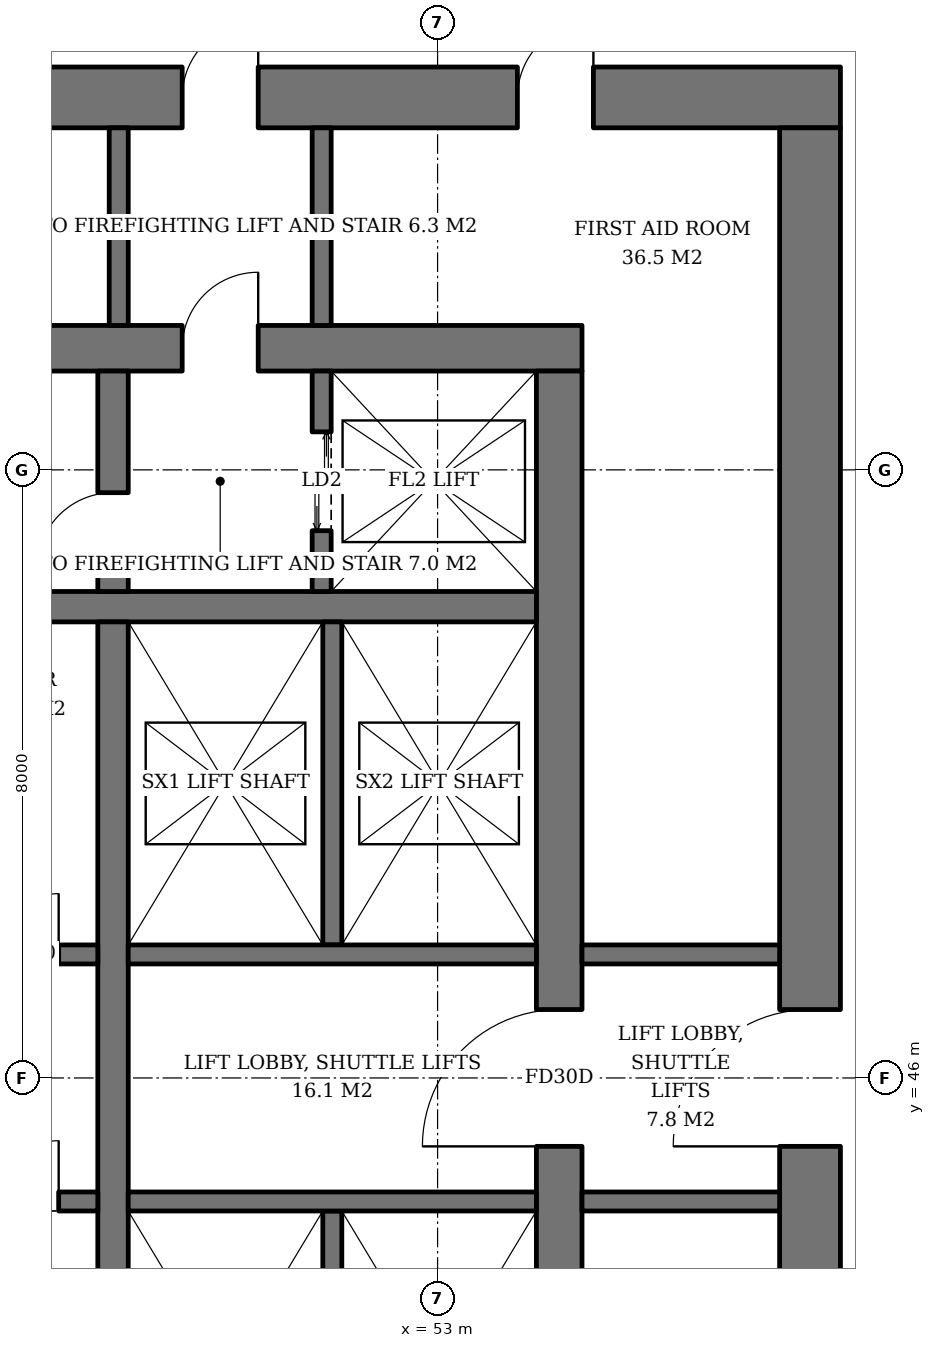
"""IFC4 building model, lengths in metres.
Left out: names, types, materials, properties, quantities, classifications, styles, units other than length and angle.
Written with IfcOpenShell. Run it as: python <this file> out.ifc"""

import sys

from ifc_helpers import new_model, si_unit, direction, frame, frame_2d, origin, place, context, subcontext, project, spatial, rectangle, extrude, element, fill, save


model = new_model("IFC4")
c1 = context("Model", 3, precision=1e-05, world=origin(), true_north=direction((0.0, 1.0)))
c2 = subcontext(c1, "Body", "Model", "MODEL_VIEW")
j1 = project(units=[si_unit("LENGTHUNIT", "METRE"), si_unit("PLANEANGLEUNIT", "RADIAN")], contexts=[c1])
p1 = place(None, origin())
s1 = spatial("IfcSite", under=j1, at=p1, CompositionType="ELEMENT")
p2 = place(p1, origin())
s2 = spatial("IfcBuilding", under=s1, at=p2, CompositionType="ELEMENT")
p3 = place(p2, frame((0.0, 0.0, 24.8)))
s3 = spatial("IfcBuildingStorey", under=s2, at=p3, CompositionType="ELEMENT", Elevation=24.8)
p4 = place(p3, frame((35.1, 55.6, 0.0), z_axis=(0.0, 0.0, 1.0), x_axis=(1.0, 0.0, 0.0)))
e1 = element("IfcWall", 1, at=p4, inside=s3, PredefinedType="SHEAR", context=c2, shape_type="SweptSolid", body=[
    extrude(rectangle(XDim=19.8, YDim=0.6, at=frame_2d((9.9, 0.0))), origin(), (0.0, 0.0, 1.0), 3.8),
])
p5 = place(p4, frame((14.54, 0.0, 0.0)))
e2 = element("IfcOpeningElement", 2, at=p5, cuts=e1, PredefinedType="OPENING", context=c2, shape_type="SweptSolid", body=[
    extrude(rectangle(XDim=1.0, YDim=2.1, at=frame_2d((0.5, 1.05))), frame((0.0, 0.31, 0.0), z_axis=(0.0, -1.0, 0.0), x_axis=(1.0, 0.0, 0.0)), (0.0, 0.0, 1.0), 0.62),
])
p6 = place(p4, frame((2.425, 0.0, 0.0)))
e3 = element("IfcOpeningElement", 3, at=p6, cuts=e1, PredefinedType="OPENING", context=c2, shape_type="SweptSolid", body=[
    extrude(rectangle(XDim=1.0, YDim=2.1, at=frame_2d((0.5, 1.05))), frame((0.0, 0.31, 0.0), z_axis=(0.0, -1.0, 0.0), x_axis=(1.0, 0.0, 0.0)), (0.0, 0.0, 1.0), 0.62),
])
p7 = place(p3, frame((54.6, 36.7, 0.0), z_axis=(0.0, 0.0, 1.0), x_axis=(0.0, 1.0, 0.0)))
e4 = element("IfcWall", 4, at=p7, inside=s3, PredefinedType="SHEAR", context=c2, shape_type="SweptSolid", body=[
    extrude(rectangle(XDim=18.6, YDim=0.6, at=frame_2d((9.3, 0.0))), origin(), (0.0, 0.0, 1.0), 3.8),
])
p8 = place(p7, frame((8.4, 0.0, 0.0)))
e5 = element("IfcOpeningElement", 5, at=p8, cuts=e4, PredefinedType="OPENING", context=c2, shape_type="SweptSolid", body=[
    extrude(rectangle(XDim=1.8, YDim=2.4, at=frame_2d((0.9, 1.2))), frame((0.0, 0.31, 0.0), z_axis=(0.0, -1.0, 0.0), x_axis=(1.0, 0.0, 0.0)), (0.0, 0.0, 1.0), 0.62),
])
p9 = place(p3, frame((31.7, 58.9, 0.0), z_axis=(0.0, 0.0, 1.0), x_axis=(1.0, 0.0, 0.0)))
e6 = element("IfcWall", 6, at=p9, inside=s3, PredefinedType="SHEAR", context=c2, shape_type="SweptSolid", body=[
    extrude(rectangle(XDim=26.6, YDim=0.8, at=frame_2d((13.3, 0.0))), origin(), (0.0, 0.0, 1.0), 3.8),
])
p10 = place(p9, frame((17.94, 0.0, 0.0)))
e7 = element("IfcOpeningElement", 7, at=p10, cuts=e6, PredefinedType="OPENING", context=c2, shape_type="SweptSolid", body=[
    extrude(rectangle(XDim=1.0, YDim=2.1, at=frame_2d((0.5, 1.05))), frame((0.0, 0.41, 0.0), z_axis=(0.0, -1.0, 0.0), x_axis=(1.0, 0.0, 0.0)), (0.0, 0.0, 1.0), 0.82),
])
p11 = place(p9, frame((5.825, 0.0, 0.0)))
e8 = element("IfcOpeningElement", 8, at=p11, cuts=e6, PredefinedType="OPENING", context=c2, shape_type="SweptSolid", body=[
    extrude(rectangle(XDim=1.0, YDim=2.1, at=frame_2d((0.5, 1.05))), frame((0.0, 0.41, 0.0), z_axis=(0.0, -1.0, 0.0), x_axis=(1.0, 0.0, 0.0)), (0.0, 0.0, 1.0), 0.82),
])
p12 = place(p9, frame((2.637, 0.0, 0.0)))
e9 = element("IfcOpeningElement", 9, at=p12, cuts=e6, PredefinedType="OPENING", context=c2, shape_type="SweptSolid", body=[
    extrude(rectangle(XDim=1.0, YDim=2.1, at=frame_2d((0.5, 1.05))), frame((0.0, 0.41, 0.0), z_axis=(0.0, -1.0, 0.0), x_axis=(1.0, 0.0, 0.0)), (0.0, 0.0, 1.0), 0.82),
])
p13 = place(p9, frame((9.126, 0.0, 0.0)))
e10 = element("IfcOpeningElement", 10, at=p13, cuts=e6, PredefinedType="OPENING", context=c2, shape_type="SweptSolid", body=[
    extrude(rectangle(XDim=1.0, YDim=2.1, at=frame_2d((0.5, 1.05))), frame((0.0, 0.41, 0.0), z_axis=(0.0, -1.0, 0.0), x_axis=(1.0, 0.0, 0.0)), (0.0, 0.0, 1.0), 0.82),
])
p14 = place(p9, frame((14.029, 0.0, 0.0)))
e11 = element("IfcOpeningElement", 11, at=p14, cuts=e6, PredefinedType="OPENING", context=c2, shape_type="SweptSolid", body=[
    extrude(rectangle(XDim=1.0, YDim=2.1, at=frame_2d((0.5, 1.05))), frame((0.0, 0.41, 0.0), z_axis=(0.0, -1.0, 0.0), x_axis=(1.0, 0.0, 0.0)), (0.0, 0.0, 1.0), 0.82),
])
p15 = place(p9, frame((22.35, 0.0, 0.0)))
e12 = element("IfcOpeningElement", 12, at=p15, cuts=e6, PredefinedType="OPENING", context=c2, shape_type="SweptSolid", body=[
    extrude(rectangle(XDim=1.0, YDim=2.1, at=frame_2d((0.5, 1.05))), frame((0.0, 0.41, 0.0), z_axis=(0.0, -1.0, 0.0), x_axis=(1.0, 0.0, 0.0)), (0.0, 0.0, 1.0), 0.82),
])
p16 = place(p3, frame((57.9, 33.5, 0.0), z_axis=(0.0, 0.0, 1.0), x_axis=(0.0, 1.0, 0.0)))
e13 = element("IfcWall", 13, at=p16, inside=s3, PredefinedType="SHEAR", context=c2, shape_type="SweptSolid", body=[
    extrude(rectangle(XDim=25.0, YDim=0.8, at=frame_2d((12.5, 0.0))), origin(), (0.0, 0.0, 1.0), 3.8),
])
p17 = place(p16, frame((11.6, 0.0, 0.0)))
e14 = element("IfcOpeningElement", 14, at=p17, cuts=e13, PredefinedType="OPENING", context=c2, shape_type="SweptSolid", body=[
    extrude(rectangle(XDim=1.8, YDim=2.4, at=frame_2d((0.9, 1.2))), frame((0.0, 0.41, 0.0), z_axis=(0.0, -1.0, 0.0), x_axis=(1.0, 0.0, 0.0)), (0.0, 0.0, 1.0), 0.82),
])
p18 = place(p3, frame((35.7, 52.2, 0.0), z_axis=(0.0, 0.0, 1.0), x_axis=(1.0, 0.0, 0.0)))
e15 = element("IfcWall", 15, at=p18, inside=s3, PredefinedType="SHEAR", context=c2, shape_type="SweptSolid", body=[
    extrude(rectangle(XDim=18.6, YDim=0.4, at=frame_2d((9.3, 0.0))), origin(), (0.0, 0.0, 1.0), 3.8),
])
p19 = place(p3, frame((48.73, 40.0, 0.0), z_axis=(0.0, 0.0, 1.0), x_axis=(0.0, 1.0, 0.0)))
e16 = element("IfcWall", 16, at=p19, inside=s3, PredefinedType="SHEAR", context=c2, shape_type="SweptSolid", body=[
    extrude(rectangle(XDim=12.0, YDim=0.4, at=frame_2d((6.0, 0.0))), origin(), (0.0, 0.0, 1.0), 3.8),
])
p20 = place(p3, frame((48.73, 52.4, 0.0), z_axis=(0.0, 0.0, 1.0), x_axis=(0.0, 1.0, 0.0)))
e17 = element("IfcWall", 17, at=p20, inside=s3, PredefinedType="SHEAR", context=c2, shape_type="SweptSolid", body=[
    extrude(rectangle(XDim=2.9, YDim=0.4, at=frame_2d((1.45, 0.0))), origin(), (0.0, 0.0, 1.0), 3.8),
])
p21 = place(p20, frame((0.3, 0.0, 0.0)))
e18 = element("IfcOpeningElement", 18, at=p21, cuts=e17, PredefinedType="OPENING", context=c2, shape_type="SweptSolid", body=[
    extrude(rectangle(XDim=1.0, YDim=2.1, at=frame_2d((0.5, 1.05))), frame((0.0, 0.21, 0.0), z_axis=(0.0, -1.0, 0.0), x_axis=(1.0, 0.0, 0.0)), (0.0, 0.0, 1.0), 0.42),
])
p22 = place(p3, frame((51.475, 52.4, 0.0), z_axis=(0.0, 0.0, 1.0), x_axis=(0.0, 1.0, 0.0)))
e19 = element("IfcWall", 19, at=p22, inside=s3, PredefinedType="SHEAR", context=c2, shape_type="SweptSolid", body=[
    extrude(rectangle(XDim=2.9, YDim=0.25, at=frame_2d((1.45, 0.0))), origin(), (0.0, 0.0, 1.0), 3.8),
])
p23 = place(p22, frame((0.8, 0.0, 0.0)))
e20 = element("IfcOpeningElement", 20, at=p23, cuts=e19, PredefinedType="OPENING", context=c2, shape_type="SweptSolid", body=[
    extrude(rectangle(XDim=1.3, YDim=2.2, at=frame_2d((0.65, 1.1))), frame((0.0, 0.135, 0.0), z_axis=(0.0, -1.0, 0.0), x_axis=(1.0, 0.0, 0.0)), (0.0, 0.0, 1.0), 0.27),
])
p24 = place(p3, frame((35.7, 47.625, 0.0), z_axis=(0.0, 0.0, 1.0), x_axis=(1.0, 0.0, 0.0)))
e21 = element("IfcWall", 21, at=p24, inside=s3, PredefinedType="SHEAR", context=c2, shape_type="SweptSolid", body=[
    extrude(rectangle(XDim=12.83, YDim=0.25, at=frame_2d((6.415, 0.0))), origin(), (0.0, 0.0, 1.0), 3.8),
])
p25 = place(p24, frame((0.7, 0.0, 0.0)))
e22 = element("IfcOpeningElement", 22, at=p25, cuts=e21, PredefinedType="OPENING", context=c2, shape_type="SweptSolid", body=[
    extrude(rectangle(XDim=1.1, YDim=2.2, at=frame_2d((0.55, 1.1))), frame((0.0, 0.135, 0.0), z_axis=(0.0, -1.0, 0.0), x_axis=(1.0, 0.0, 0.0)), (0.0, 0.0, 1.0), 0.27),
])
p26 = place(p24, frame((3.45, 0.0, 0.0)))
e23 = element("IfcOpeningElement", 23, at=p26, cuts=e21, PredefinedType="OPENING", context=c2, shape_type="SweptSolid", body=[
    extrude(rectangle(XDim=1.1, YDim=2.2, at=frame_2d((0.55, 1.1))), frame((0.0, 0.135, 0.0), z_axis=(0.0, -1.0, 0.0), x_axis=(1.0, 0.0, 0.0)), (0.0, 0.0, 1.0), 0.27),
])
p27 = place(p24, frame((6.2, 0.0, 0.0)))
e24 = element("IfcOpeningElement", 24, at=p27, cuts=e21, PredefinedType="OPENING", context=c2, shape_type="SweptSolid", body=[
    extrude(rectangle(XDim=1.1, YDim=2.2, at=frame_2d((0.55, 1.1))), frame((0.0, 0.135, 0.0), z_axis=(0.0, -1.0, 0.0), x_axis=(1.0, 0.0, 0.0)), (0.0, 0.0, 1.0), 0.27),
])
p28 = place(p24, frame((8.95, 0.0, 0.0)))
e25 = element("IfcOpeningElement", 25, at=p28, cuts=e21, PredefinedType="OPENING", context=c2, shape_type="SweptSolid", body=[
    extrude(rectangle(XDim=1.1, YDim=2.2, at=frame_2d((0.55, 1.1))), frame((0.0, 0.135, 0.0), z_axis=(0.0, -1.0, 0.0), x_axis=(1.0, 0.0, 0.0)), (0.0, 0.0, 1.0), 0.27),
])
p29 = place(p24, frame((11.515, 0.0, 0.0)))
e26 = element("IfcOpeningElement", 26, at=p29, cuts=e21, PredefinedType="OPENING", context=c2, shape_type="SweptSolid", body=[
    extrude(rectangle(XDim=0.8, YDim=2.0, at=frame_2d((0.4, 1.0))), frame((0.0, 0.135, 0.0), z_axis=(0.0, -1.0, 0.0), x_axis=(1.0, 0.0, 0.0)), (0.0, 0.0, 1.0), 0.27),
])
p30 = place(p3, frame((35.7, 44.375, 0.0), z_axis=(0.0, 0.0, 1.0), x_axis=(1.0, 0.0, 0.0)))
e27 = element("IfcWall", 27, at=p30, inside=s3, PredefinedType="SHEAR", context=c2, shape_type="SweptSolid", body=[
    extrude(rectangle(XDim=12.83, YDim=0.25, at=frame_2d((6.415, 0.0))), origin(), (0.0, 0.0, 1.0), 3.8),
])
p31 = place(p30, frame((0.7, 0.0, 0.0)))
e28 = element("IfcOpeningElement", 28, at=p31, cuts=e27, PredefinedType="OPENING", context=c2, shape_type="SweptSolid", body=[
    extrude(rectangle(XDim=1.1, YDim=2.2, at=frame_2d((0.55, 1.1))), frame((0.0, 0.135, 0.0), z_axis=(0.0, -1.0, 0.0), x_axis=(1.0, 0.0, 0.0)), (0.0, 0.0, 1.0), 0.27),
])
p32 = place(p30, frame((3.45, 0.0, 0.0)))
e29 = element("IfcOpeningElement", 29, at=p32, cuts=e27, PredefinedType="OPENING", context=c2, shape_type="SweptSolid", body=[
    extrude(rectangle(XDim=1.1, YDim=2.2, at=frame_2d((0.55, 1.1))), frame((0.0, 0.135, 0.0), z_axis=(0.0, -1.0, 0.0), x_axis=(1.0, 0.0, 0.0)), (0.0, 0.0, 1.0), 0.27),
])
p33 = place(p30, frame((6.2, 0.0, 0.0)))
e30 = element("IfcOpeningElement", 30, at=p33, cuts=e27, PredefinedType="OPENING", context=c2, shape_type="SweptSolid", body=[
    extrude(rectangle(XDim=1.1, YDim=2.2, at=frame_2d((0.55, 1.1))), frame((0.0, 0.135, 0.0), z_axis=(0.0, -1.0, 0.0), x_axis=(1.0, 0.0, 0.0)), (0.0, 0.0, 1.0), 0.27),
])
p34 = place(p30, frame((8.95, 0.0, 0.0)))
e31 = element("IfcOpeningElement", 31, at=p34, cuts=e27, PredefinedType="OPENING", context=c2, shape_type="SweptSolid", body=[
    extrude(rectangle(XDim=1.1, YDim=2.2, at=frame_2d((0.55, 1.1))), frame((0.0, 0.135, 0.0), z_axis=(0.0, -1.0, 0.0), x_axis=(1.0, 0.0, 0.0)), (0.0, 0.0, 1.0), 0.27),
])
p35 = place(p30, frame((11.515, 0.0, 0.0)))
e32 = element("IfcOpeningElement", 32, at=p35, cuts=e27, PredefinedType="OPENING", context=c2, shape_type="SweptSolid", body=[
    extrude(rectangle(XDim=0.8, YDim=2.0, at=frame_2d((0.4, 1.0))), frame((0.0, 0.135, 0.0), z_axis=(0.0, -1.0, 0.0), x_axis=(1.0, 0.0, 0.0)), (0.0, 0.0, 1.0), 0.27),
])
p36 = place(p3, frame((51.615, 47.75, 0.0), z_axis=(0.0, 0.0, 1.0), x_axis=(0.0, 1.0, 0.0)))
e33 = element("IfcWall", 33, at=p36, inside=s3, PredefinedType="SHEAR", context=c2, shape_type="SweptSolid", body=[
    extrude(rectangle(XDim=4.25, YDim=0.25, at=frame_2d((2.125, 0.0))), origin(), (0.0, 0.0, 1.0), 3.8),
])
p37 = place(p3, frame((48.93, 47.625, 0.0), z_axis=(0.0, 0.0, 1.0), x_axis=(1.0, 0.0, 0.0)))
e34 = element("IfcWall", 34, at=p37, inside=s3, PredefinedType="SHEAR", context=c2, shape_type="SweptSolid", body=[
    extrude(rectangle(XDim=5.37, YDim=0.25, at=frame_2d((2.685, 0.0))), origin(), (0.0, 0.0, 1.0), 3.8),
])
p38 = place(p3, frame((51.615, 44.25, 0.0), z_axis=(0.0, 0.0, 1.0), x_axis=(0.0, -1.0, 0.0)))
e35 = element("IfcWall", 35, at=p38, inside=s3, PredefinedType="SHEAR", context=c2, shape_type="SweptSolid", body=[
    extrude(rectangle(XDim=4.25, YDim=0.25, at=frame_2d((2.125, 0.0))), origin(), (0.0, 0.0, 1.0), 3.8),
])
p39 = place(p3, frame((48.93, 44.375, 0.0), z_axis=(0.0, 0.0, 1.0), x_axis=(1.0, 0.0, 0.0)))
e36 = element("IfcWall", 36, at=p39, inside=s3, PredefinedType="SHEAR", context=c2, shape_type="SweptSolid", body=[
    extrude(rectangle(XDim=5.37, YDim=0.25, at=frame_2d((2.685, 0.0))), origin(), (0.0, 0.0, 1.0), 3.8),
])
for number, where, z_axis, x_axis in (
    (37, (48.805, 55.9, 0.0), (0.0, 0.0, 1.0), (0.0, 1.0, 0.0)),
    (38, (51.475, 55.9, 0.0), (0.0, 0.0, 1.0), (0.0, 1.0, 0.0)),
    (39, (54.9, 44.375, 0.0), (0.0, 0.0, 1.0), (1.0, 0.0, 0.0)),
    (40, (54.9, 47.625, 0.0), (0.0, 0.0, 1.0), (1.0, 0.0, 0.0)),
):
    element("IfcWall", number, at=place(p3, frame(where, z_axis=z_axis, x_axis=x_axis)), inside=s3, PredefinedType="SOLIDWALL", context=c2, shape_type="SweptSolid", body=[
        extrude(rectangle(XDim=2.6, YDim=0.25, at=frame_2d((1.3, 0.0))), origin(), (0.0, 0.0, 1.0), 3.62),
    ])
p40 = place(p23, origin())
e41 = element("IfcDoor", 41, at=p40, inside=s3, OperationType="DOUBLE_DOOR_SLIDING", PredefinedType="DOOR", context=c2, shape_type="SweptSolid", body=[
    extrude(rectangle(XDim=1.3, YDim=2.2, at=frame_2d((0.65, 1.1))), frame((0.0, 0.025, 0.0), z_axis=(0.0, -1.0, 0.0), x_axis=(1.0, 0.0, 0.0)), (0.0, 0.0, 1.0), 0.05),
])
fill(e20, e41)
p41 = place(p29, origin())
e42 = element("IfcDoor", 42, at=p41, inside=s3, OperationType="SINGLE_SWING_RIGHT", PredefinedType="DOOR", context=c2, shape_type="SweptSolid", body=[
    extrude(rectangle(XDim=0.8, YDim=2.0, at=frame_2d((0.4, 1.0))), frame((0.0, 0.025, 0.0), z_axis=(0.0, -1.0, 0.0), x_axis=(1.0, 0.0, 0.0)), (0.0, 0.0, 1.0), 0.05),
])
fill(e26, e42)
p42 = place(p35, origin())
e43 = element("IfcDoor", 43, at=p42, inside=s3, OperationType="SINGLE_SWING_RIGHT", PredefinedType="DOOR", context=c2, shape_type="SweptSolid", body=[
    extrude(rectangle(XDim=0.8, YDim=2.0, at=frame_2d((0.4, 1.0))), frame((0.0, 0.025, 0.0), z_axis=(0.0, -1.0, 0.0), x_axis=(1.0, 0.0, 0.0)), (0.0, 0.0, 1.0), 0.05),
])
fill(e32, e43)
p43 = place(p21, origin())
e44 = element("IfcDoor", 44, at=p43, inside=s3, OperationType="SINGLE_SWING_LEFT", PredefinedType="DOOR", context=c2, shape_type="SweptSolid", body=[
    extrude(rectangle(XDim=1.0, YDim=2.1, at=frame_2d((0.5, 1.05))), frame((0.0, 0.025, 0.0), z_axis=(0.0, -1.0, 0.0), x_axis=(1.0, 0.0, 0.0)), (0.0, 0.0, 1.0), 0.05),
])
fill(e18, e44)
p44 = place(p5, origin())
e45 = element("IfcDoor", 45, at=p44, inside=s3, OperationType="SINGLE_SWING_RIGHT", PredefinedType="DOOR", context=c2, shape_type="SweptSolid", body=[
    extrude(rectangle(XDim=1.0, YDim=2.1, at=frame_2d((0.5, 1.05))), frame((0.0, 0.025, 0.0), z_axis=(0.0, -1.0, 0.0), x_axis=(1.0, 0.0, 0.0)), (0.0, 0.0, 1.0), 0.05),
])
fill(e2, e45)
p45 = place(p8, origin())
e46 = element("IfcDoor", 46, at=p45, inside=s3, OperationType="DOUBLE_DOOR_SINGLE_SWING", PredefinedType="DOOR", context=c2, shape_type="SweptSolid", body=[
    extrude(rectangle(XDim=1.8, YDim=2.4, at=frame_2d((0.9, 1.2))), frame((0.0, 0.025, 0.0), z_axis=(0.0, -1.0, 0.0), x_axis=(1.0, 0.0, 0.0)), (0.0, 0.0, 1.0), 0.05),
])
fill(e5, e46)
p46 = place(p17, origin())
e47 = element("IfcDoor", 47, at=p46, inside=s3, OperationType="DOUBLE_DOOR_SINGLE_SWING", PredefinedType="DOOR", context=c2, shape_type="SweptSolid", body=[
    extrude(rectangle(XDim=1.8, YDim=2.4, at=frame_2d((0.9, 1.2))), frame((0.0, 0.025, 0.0), z_axis=(0.0, -1.0, 0.0), x_axis=(1.0, 0.0, 0.0)), (0.0, 0.0, 1.0), 0.05),
])
fill(e14, e47)
p47 = place(p10, origin())
e48 = element("IfcDoor", 48, at=p47, inside=s3, OperationType="SINGLE_SWING_RIGHT", PredefinedType="DOOR", context=c2, shape_type="SweptSolid", body=[
    extrude(rectangle(XDim=1.0, YDim=2.1, at=frame_2d((0.5, 1.05))), frame((0.0, 0.025, 0.0), z_axis=(0.0, -1.0, 0.0), x_axis=(1.0, 0.0, 0.0)), (0.0, 0.0, 1.0), 0.05),
])
fill(e7, e48)
p48 = place(p15, origin())
e49 = element("IfcDoor", 49, at=p48, inside=s3, OperationType="SINGLE_SWING_RIGHT", PredefinedType="DOOR", context=c2, shape_type="SweptSolid", body=[
    extrude(rectangle(XDim=1.0, YDim=2.1, at=frame_2d((0.5, 1.05))), frame((0.0, -0.34, 0.0), z_axis=(0.0, -1.0, 0.0), x_axis=(1.0, 0.0, 0.0)), (0.0, 0.0, 1.0), 0.05),
])
fill(e12, e49)
save(model, sys.argv[1])
